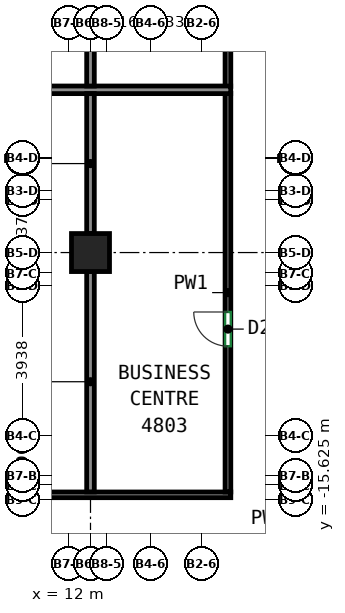
"""IFC4 building model, lengths in metres.
Left out: names, types, materials, properties, quantities, classifications, styles, units other than length and angle.
Written with IfcOpenShell. Run it as: python <this file> out.ifc"""

import sys

from ifc_helpers import new_model, si_unit, direction, frame, frame_2d, origin, origin_2d, place, context, subcontext, project, spatial, rectangle, extrude, source, transform, mapped, element, fill, save


model = new_model("IFC4")
c1 = context("Model", 3, precision=1e-05, world=origin(), true_north=direction((0.0, 1.0)))
c2 = subcontext(c1, "Body", "Model", "MODEL_VIEW")
j1 = project(units=[si_unit("LENGTHUNIT", "METRE"), si_unit("PLANEANGLEUNIT", "RADIAN")], contexts=[c1])
p1 = place(None, origin())
s1 = spatial("IfcSite", under=j1, at=p1, CompositionType="ELEMENT")
p2 = place(p1, origin())
s2 = spatial("IfcBuilding", under=s1, at=p2, CompositionType="ELEMENT")
p3 = place(p2, frame((0.0, 0.0, 199.9)))
s3 = spatial("IfcBuildingStorey", under=s2, at=p3, CompositionType="ELEMENT", Elevation=199.9)
m1 = source(origin(), c2, "Body", "SweptSolid", [
    extrude(rectangle(XDim=1.0, YDim=1.0, at=origin_2d()), origin(), (0.0, 0.0, 1.0), 3.12),
])
p4 = place(p3, frame((12.583, -9.125, 0.0), z_axis=(0.0, 0.0, 1.0), x_axis=(1.0, 0.0, 0.0)))
e1 = element("IfcColumn", 1, at=p4, inside=s3, PredefinedType="COLUMN", context=c2, shape_type="MappedRepresentation", body=[
    mapped(m1, transform((0.0, 0.0, 0.0))),
])
p5 = place(p3, frame((16.2, -4.753, 0.0), z_axis=(0.0, 0.0, 1.0), x_axis=(0.0, 1.0, 0.0)))
e2 = element("IfcWall", 2, at=p5, inside=s3, PredefinedType="PARTITIONING", context=c2, shape_type="SweptSolid", body=[
    extrude(rectangle(XDim=8.378, YDim=0.15, at=frame_2d((4.189, 0.0))), origin(), (0.0, 0.0, 1.0), 3.12),
])
p6 = place(p5, frame((3.031, 0.0, 0.0)))
e3 = element("IfcOpeningElement", 3, at=p6, cuts=e2, PredefinedType="OPENING", context=c2, shape_type="SweptSolid", body=[
    extrude(rectangle(XDim=0.9, YDim=2.1, at=frame_2d((0.45, 1.05))), frame((0.0, 0.085, 0.0), z_axis=(0.0, -1.0, 0.0), x_axis=(1.0, 0.0, 0.0)), (0.0, 0.0, 1.0), 0.17),
])
p7 = place(p3, frame((-6.385, -15.5, 0.0), z_axis=(0.0, 0.0, 1.0), x_axis=(1.0, 0.0, 0.0)))
e4 = element("IfcWall", 4, at=p7, inside=s3, PredefinedType="PARTITIONING", context=c2, shape_type="SweptSolid", body=[
    extrude(rectangle(XDim=22.66, YDim=0.15, at=frame_2d((11.33, 0.0))), origin(), (0.0, 0.0, 1.0), 3.12),
])
p8 = place(p7, frame((7.266, 0.0, 0.0)))
e5 = element("IfcOpeningElement", 5, at=p8, cuts=e4, PredefinedType="OPENING", context=c2, shape_type="SweptSolid", body=[
    extrude(rectangle(XDim=0.9, YDim=2.1, at=frame_2d((0.45, 1.05))), frame((0.0, 0.085, 0.0), z_axis=(0.0, -1.0, 0.0), x_axis=(1.0, 0.0, 0.0)), (0.0, 0.0, 1.0), 0.17),
])
p9 = place(p7, frame((14.576, 0.0, 0.0)))
e6 = element("IfcOpeningElement", 6, at=p9, cuts=e4, PredefinedType="OPENING", context=c2, shape_type="SweptSolid", body=[
    extrude(rectangle(XDim=0.9, YDim=2.1, at=frame_2d((0.45, 1.05))), frame((0.0, 0.085, 0.0), z_axis=(0.0, -1.0, 0.0), x_axis=(1.0, 0.0, 0.0)), (0.0, 0.0, 1.0), 0.17),
])
p10 = place(p3, frame((16.2, -15.425, 0.0), z_axis=(0.0, 0.0, 1.0), x_axis=(0.0, 1.0, 0.0)))
e7 = element("IfcWall", 7, at=p10, inside=s3, PredefinedType="PARTITIONING", context=c2, shape_type="SweptSolid", body=[
    extrude(rectangle(XDim=10.492, YDim=0.15, at=frame_2d((5.246, 0.0))), origin(), (0.0, 0.0, 1.0), 3.12),
])
p11 = place(p10, frame((3.836, 0.0, 0.0)))
e8 = element("IfcOpeningElement", 8, at=p11, cuts=e7, PredefinedType="OPENING", context=c2, shape_type="SweptSolid", body=[
    extrude(rectangle(XDim=0.9, YDim=2.1, at=frame_2d((0.45, 1.05))), frame((0.0, 0.085, 0.0), z_axis=(0.0, -1.0, 0.0), x_axis=(1.0, 0.0, 0.0)), (0.0, 0.0, 1.0), 0.17),
])
p12 = place(p3, frame((-13.873, -4.843, 0.0), z_axis=(0.0, 0.0, 1.0), x_axis=(1.0, 0.0, 0.0)))
e9 = element("IfcWall", 9, at=p12, inside=s3, PredefinedType="PARTITIONING", context=c2, shape_type="SweptSolid", body=[
    extrude(rectangle(XDim=30.146, YDim=0.2, at=frame_2d((15.073, 0.0))), origin(), (0.0, 0.0, 1.0), 3.12),
])
p13 = place(p3, frame((12.583, -4.743, 0.0), z_axis=(0.0, 0.0, 1.0), x_axis=(0.0, 1.0, 0.0)))
e10 = element("IfcWall", 10, at=p13, inside=s3, PredefinedType="PARTITIONING", context=c2, shape_type="SweptSolid", body=[
    extrude(rectangle(XDim=3.681, YDim=0.2, at=frame_2d((1.84, 0.0))), origin(), (0.0, 0.0, 1.0), 2.52),
])
p14 = place(p3, frame((12.583, -8.625, 0.0), z_axis=(0.0, 0.0, 1.0), x_axis=(0.0, 1.0, 0.0)))
e11 = element("IfcWall", 11, at=p14, inside=s3, PredefinedType="PARTITIONING", context=c2, shape_type="SweptSolid", body=[
    extrude(rectangle(XDim=3.682, YDim=0.2, at=frame_2d((1.841, 0.0))), origin(), (0.0, 0.0, 1.0), 2.52),
])
p15 = place(p3, frame((12.583, -15.423, 0.0), z_axis=(0.0, 0.0, 1.0), x_axis=(0.0, 1.0, 0.0)))
e12 = element("IfcWall", 12, at=p15, inside=s3, PredefinedType="PARTITIONING", context=c2, shape_type="SweptSolid", body=[
    extrude(rectangle(XDim=5.798, YDim=0.2, at=frame_2d((2.899, 0.0))), origin(), (0.0, 0.0, 1.0), 2.52),
])
p16 = place(p11, origin())
e13 = element("IfcDoor", 13, at=p16, inside=s3, OperationType="SINGLE_SWING_RIGHT", PredefinedType="DOOR", context=c2, shape_type="SweptSolid", body=[
    extrude(rectangle(XDim=0.9, YDim=2.1, at=frame_2d((0.45, 1.05))), frame((0.0, 0.025, 0.0), z_axis=(0.0, -1.0, 0.0), x_axis=(1.0, 0.0, 0.0)), (0.0, 0.0, 1.0), 0.05),
])
fill(e8, e13)
save(model, sys.argv[1])
